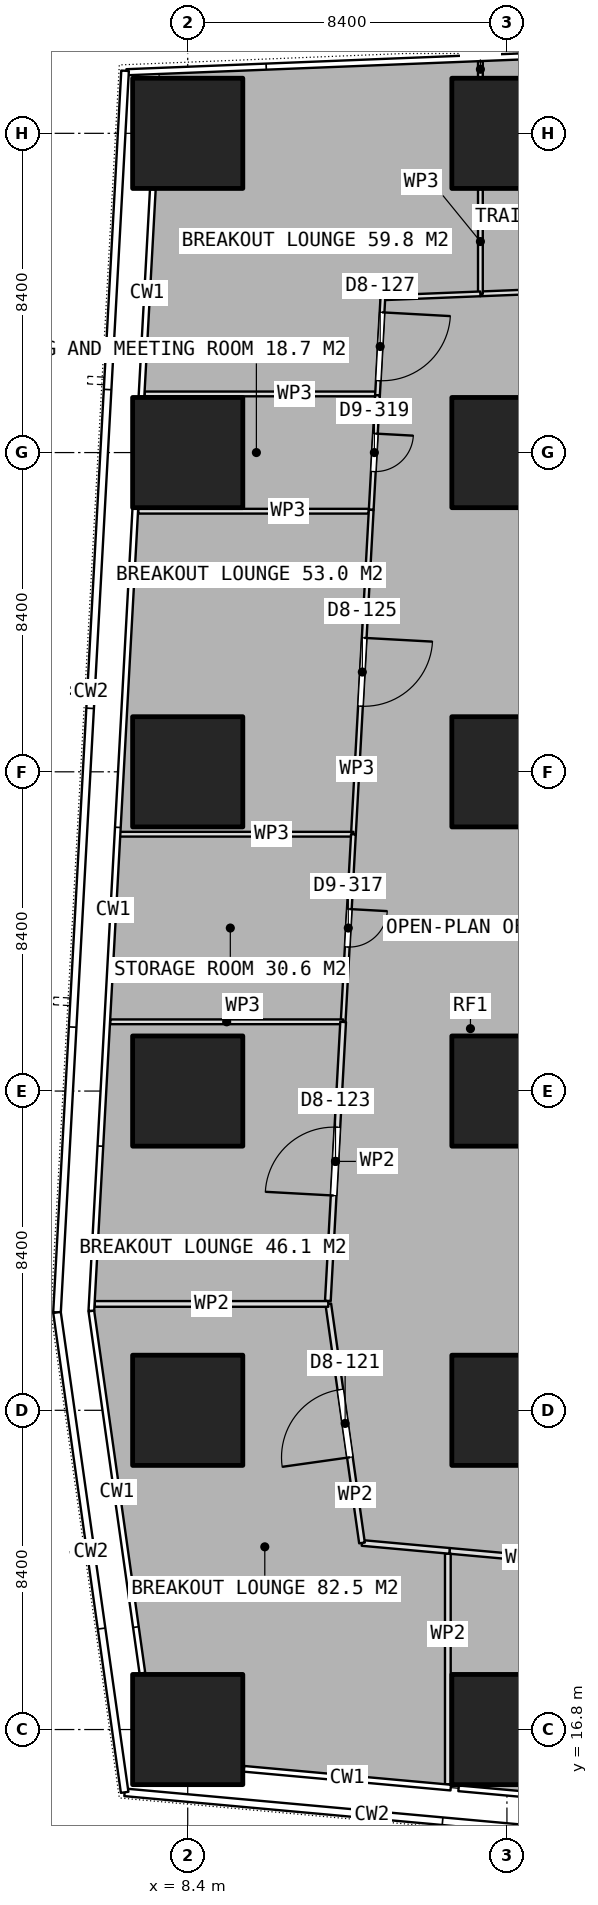
"""IFC4 building model, lengths in metres.
Left out: names, types, materials, properties, quantities, classifications, styles, units other than length and angle.
Written with IfcOpenShell. Run it as: python <this file> out.ifc"""

import sys

from ifc_helpers import new_model, si_unit, direction, frame, frame_2d, origin, origin_2d, place, context, subcontext, project, spatial, rectangle, extrude, element, fill, save


model = new_model("IFC4")
c1 = context("Model", 3, precision=1e-05, world=origin(), true_north=direction((0.0, 1.0)))
c2 = subcontext(c1, "Body", "Model", "MODEL_VIEW")
j1 = project(units=[si_unit("LENGTHUNIT", "METRE"), si_unit("PLANEANGLEUNIT", "RADIAN")], contexts=[c1])
p1 = place(None, origin())
s1 = spatial("IfcSite", under=j1, at=p1, CompositionType="ELEMENT")
p2 = place(p1, origin())
s2 = spatial("IfcBuilding", under=s1, at=p2, CompositionType="ELEMENT")
p3 = place(p2, frame((0.0, 0.0, 95.3)))
s3 = spatial("IfcBuildingStorey", under=s2, at=p3, CompositionType="ELEMENT", Elevation=95.3)
for number, where, z_axis, x_axis in (
    (1, (8.4, 16.8, 0.0), (0.0, 0.0, 1.0), (1.0, 0.0, 0.0)),
    (2, (8.4, 25.2, 0.0), (0.0, 0.0, 1.0), (1.0, 0.0, 0.0)),
    (3, (8.4, 33.6, 0.0), (0.0, 0.0, 1.0), (1.0, 0.0, 0.0)),
    (4, (8.4, 42.0, 0.0), (0.0, 0.0, 1.0), (1.0, 0.0, 0.0)),
    (5, (8.4, 50.4, 0.0), (0.0, 0.0, 1.0), (1.0, 0.0, 0.0)),
    (6, (8.4, 58.8, 0.0), (0.0, 0.0, 1.0), (1.0, 0.0, 0.0)),
    (7, (16.8, 16.8, 0.0), (0.0, 0.0, 1.0), (1.0, 0.0, 0.0)),
    (8, (16.8, 25.2, 0.0), (0.0, 0.0, 1.0), (1.0, 0.0, 0.0)),
    (9, (16.8, 33.6, 0.0), (0.0, 0.0, 1.0), (1.0, 0.0, 0.0)),
    (10, (16.8, 42.0, 0.0), (0.0, 0.0, 1.0), (1.0, 0.0, 0.0)),
    (11, (16.8, 50.4, 0.0), (0.0, 0.0, 1.0), (1.0, 0.0, 0.0)),
    (12, (16.8, 58.8, 0.0), (0.0, 0.0, 1.0), (1.0, 0.0, 0.0)),
):
    element("IfcColumn", number, at=place(p3, frame(where, z_axis=z_axis, x_axis=x_axis)), inside=s3, PredefinedType="COLUMN", context=c2, shape_type="SweptSolid", body=[
        extrude(rectangle(XDim=2.9, YDim=2.9, at=origin_2d()), origin(), (0.0, 0.0, 1.0), 3.75),
    ])
p4 = place(p3, frame((25.413, 54.949, 0.0), z_axis=(0.0, 0.0, 1.0), x_axis=(-0.999198361773, -0.04003290935, 0.0)))
e13 = element("IfcWall", 13, at=p4, inside=s3, PredefinedType="PARTITIONING", context=c2, shape_type="SweptSolid", body=[
    extrude(rectangle(XDim=9.319, YDim=0.125, at=frame_2d((4.659, 0.0))), origin(), (0.0, 0.0, 1.0), 3.5),
])
p5 = place(p4, frame((3.759, 0.0, 0.0)))
e14 = element("IfcOpeningElement", 14, at=p5, cuts=e13, PredefinedType="OPENING", context=c2, shape_type="SweptSolid", body=[
    extrude(rectangle(XDim=1.8, YDim=2.1, at=frame_2d((0.9, 1.05))), frame((0.0, 0.073, 0.0), z_axis=(0.0, -1.0, 0.0), x_axis=(1.0, 0.0, 0.0)), (0.0, 0.0, 1.0), 0.145),
])
p6 = place(p3, frame((16.102, 54.576, 0.0), z_axis=(0.0, 0.0, 1.0), x_axis=(0.0, 1.0, 0.0)))
e15 = element("IfcWall", 15, at=p6, inside=s3, PredefinedType="PARTITIONING", context=c2, shape_type="SweptSolid", body=[
    extrude(rectangle(XDim=2.754, YDim=0.125, at=frame_2d((1.377, 0.0))), origin(), (0.0, 0.0, 1.0), 3.5),
])
p7 = place(p3, frame((16.102, 60.27, 0.0), z_axis=(0.0, 0.0, 1.0), x_axis=(0.0, 1.0, 0.0)))
e16 = element("IfcWall", 16, at=p7, inside=s3, PredefinedType="PARTITIONING", context=c2, shape_type="SweptSolid", body=[
    extrude(rectangle(XDim=0.43, YDim=0.125, at=frame_2d((0.215, 0.0))), origin(), (0.0, 0.0, 1.0), 3.5),
])
p8 = place(p3, frame((13.333, 51.943, 0.0), z_axis=(0.0, 0.0, 1.0), x_axis=(-1.0, 0.0, 0.0)))
e17 = element("IfcWall", 17, at=p8, inside=s3, PredefinedType="PARTITIONING", context=c2, shape_type="SweptSolid", body=[
    extrude(rectangle(XDim=6.066, YDim=0.125, at=frame_2d((3.033, 0.0))), origin(), (0.0, 0.0, 1.0), 3.5),
])
p9 = place(p3, frame((16.101, 54.576, 0.0), z_axis=(0.0, 0.0, 1.0), x_axis=(-0.999195025369, -0.040116097489, 0.0)))
e18 = element("IfcWall", 18, at=p9, inside=s3, PredefinedType="PARTITIONING", context=c2, shape_type="SweptSolid", body=[
    extrude(rectangle(XDim=2.568, YDim=0.125, at=frame_2d((1.284, 0.0))), origin(), (0.0, 0.0, 1.0), 3.5),
])
p10 = place(p3, frame((13.535, 54.473, 0.0), z_axis=(0.0, 0.0, 1.0), x_axis=(-0.054838354895, -0.998495245273, 0.0)))
e19 = element("IfcWall", 19, at=p10, inside=s3, PredefinedType="PARTITIONING", context=c2, shape_type="SweptSolid", body=[
    extrude(rectangle(XDim=2.569, YDim=0.125, at=frame_2d((1.284, 0.0))), origin(), (0.0, 0.0, 1.0), 3.5),
])
p11 = place(p10, frame((0.384, 0.0, 0.0)))
e20 = element("IfcOpeningElement", 20, at=p11, cuts=e19, PredefinedType="OPENING", context=c2, shape_type="SweptSolid", body=[
    extrude(rectangle(XDim=1.8, YDim=2.1, at=frame_2d((0.9, 1.05))), frame((0.0, 0.073, 0.0), z_axis=(0.0, -1.0, 0.0), x_axis=(1.0, 0.0, 0.0)), (0.0, 0.0, 1.0), 0.145),
])
p12 = place(p3, frame((13.394, 51.907, 0.0), z_axis=(0.0, 0.0, 1.0), x_axis=(-0.054694766207, -0.998503120951, 0.0)))
e21 = element("IfcWall", 21, at=p12, inside=s3, PredefinedType="PARTITIONING", context=c2, shape_type="SweptSolid", body=[
    extrude(rectangle(XDim=3.018, YDim=0.125, at=frame_2d((1.509, 0.0))), origin(), (0.0, 0.0, 1.0), 3.5),
])
p13 = place(p12, frame((1.009, 0.0, 0.0)))
e22 = element("IfcOpeningElement", 22, at=p13, cuts=e21, PredefinedType="OPENING", context=c2, shape_type="SweptSolid", body=[
    extrude(rectangle(XDim=1.0, YDim=2.1, at=frame_2d((0.5, 1.05))), frame((0.0, 0.073, 0.0), z_axis=(0.0, -1.0, 0.0), x_axis=(1.0, 0.0, 0.0)), (0.0, 0.0, 1.0), 0.145),
])
p14 = place(p3, frame((13.164, 48.857, 0.0), z_axis=(0.0, 0.0, 1.0), x_axis=(-1.0, 0.0, 0.0)))
e23 = element("IfcWall", 23, at=p14, inside=s3, PredefinedType="PARTITIONING", context=c2, shape_type="SweptSolid", body=[
    extrude(rectangle(XDim=6.066, YDim=0.125, at=frame_2d((3.033, 0.0))), origin(), (0.0, 0.0, 1.0), 3.5),
])
p15 = place(p3, frame((13.229, 48.893, 0.0), z_axis=(0.0, 0.0, 1.0), x_axis=(-0.054751844568, -0.998499992747, 0.0)))
e24 = element("IfcWall", 24, at=p15, inside=s3, PredefinedType="PARTITIONING", context=c2, shape_type="SweptSolid", body=[
    extrude(rectangle(XDim=8.548, YDim=0.125, at=frame_2d((4.274, 0.0))), origin(), (0.0, 0.0, 1.0), 3.5),
])
p16 = place(p15, frame((3.374, 0.0, 0.0)))
e25 = element("IfcOpeningElement", 25, at=p16, cuts=e24, PredefinedType="OPENING", context=c2, shape_type="SweptSolid", body=[
    extrude(rectangle(XDim=1.8, YDim=2.1, at=frame_2d((0.9, 1.05))), frame((0.0, 0.073, 0.0), z_axis=(0.0, -1.0, 0.0), x_axis=(1.0, 0.0, 0.0)), (0.0, 0.0, 1.0), 0.145),
])
p17 = place(p3, frame((12.761, 40.358, 0.0), z_axis=(0.0, 0.0, 1.0), x_axis=(-1.0, 0.0, 0.0)))
e26 = element("IfcWall", 26, at=p17, inside=s3, PredefinedType="PARTITIONING", context=c2, shape_type="SweptSolid", body=[
    extrude(rectangle(XDim=6.159, YDim=0.125, at=frame_2d((3.08, 0.0))), origin(), (0.0, 0.0, 1.0), 3.5),
])
p18 = place(p3, frame((12.761, 40.357, 0.0), z_axis=(0.0, 0.0, 1.0), x_axis=(-0.054832537322, -0.998495564763, 0.0)))
e27 = element("IfcWall", 27, at=p18, inside=s3, PredefinedType="PARTITIONING", context=c2, shape_type="SweptSolid", body=[
    extrude(rectangle(XDim=4.942, YDim=0.125, at=frame_2d((2.471, 0.0))), origin(), (0.0, 0.0, 1.0), 3.5),
])
p19 = place(p18, frame((1.971, 0.0, 0.0)))
e28 = element("IfcOpeningElement", 28, at=p19, cuts=e27, PredefinedType="OPENING", context=c2, shape_type="SweptSolid", body=[
    extrude(rectangle(XDim=1.0, YDim=2.1, at=frame_2d((0.5, 1.05))), frame((0.0, 0.073, 0.0), z_axis=(0.0, -1.0, 0.0), x_axis=(1.0, 0.0, 0.0)), (0.0, 0.0, 1.0), 0.145),
])
p20 = place(p3, frame((12.49, 35.422, 0.0), z_axis=(0.0, 0.0, 1.0), x_axis=(-1.0, 0.0, 0.0)))
e29 = element("IfcWall", 29, at=p20, inside=s3, PredefinedType="PARTITIONING", context=c2, shape_type="SweptSolid", body=[
    extrude(rectangle(XDim=6.129, YDim=0.125, at=frame_2d((3.064, 0.0))), origin(), (0.0, 0.0, 1.0), 3.5),
])
p21 = place(p3, frame((19.125, 21.153, 0.0), z_axis=(0.0, 0.0, 1.0), x_axis=(-0.99591033818, 0.090347099052, 0.0)))
e30 = element("IfcWall", 30, at=p21, inside=s3, PredefinedType="PARTITIONING", context=c2, shape_type="SweptSolid", body=[
    extrude(rectangle(XDim=3.851, YDim=0.15, at=frame_2d((1.925, 0.0))), origin(), (0.0, 0.0, 1.0), 3.5),
])
p22 = place(p3, frame((15.245, 21.43, 0.0), z_axis=(0.0, 0.0, 1.0), x_axis=(0.0, -1.0, 0.0)))
e31 = element("IfcWall", 31, at=p22, inside=s3, PredefinedType="PARTITIONING", context=c2, shape_type="SweptSolid", body=[
    extrude(rectangle(XDim=6.07, YDim=0.15, at=frame_2d((3.035, 0.0))), origin(), (0.0, 0.0, 1.0), 3.5),
])
p23 = place(p3, frame((15.29, 21.501, 0.0), z_axis=(0.0, 0.0, 1.0), x_axis=(-0.995911351873, 0.090335924256, 0.0)))
e32 = element("IfcWall", 32, at=p23, inside=s3, PredefinedType="PARTITIONING", context=c2, shape_type="SweptSolid", body=[
    extrude(rectangle(XDim=2.313, YDim=0.15, at=frame_2d((1.157, 0.0))), origin(), (0.0, 0.0, 1.0), 3.5),
])
p24 = place(p3, frame((12.986, 21.71, 0.0), z_axis=(0.0, 0.0, 1.0), x_axis=(-0.139650607895, 0.99020084211, 0.0)))
e33 = element("IfcWall", 33, at=p24, inside=s3, PredefinedType="PARTITIONING", context=c2, shape_type="SweptSolid", body=[
    extrude(rectangle(XDim=6.351, YDim=0.15, at=frame_2d((3.176, 0.0))), origin(), (0.0, 0.0, 1.0), 3.5),
])
p25 = place(p24, frame((2.276, 0.0, 0.0)))
e34 = element("IfcOpeningElement", 34, at=p25, cuts=e33, PredefinedType="OPENING", context=c2, shape_type="SweptSolid", body=[
    extrude(rectangle(XDim=1.8, YDim=2.1, at=frame_2d((0.9, 1.05))), frame((0.0, 0.085, 0.0), z_axis=(0.0, -1.0, 0.0), x_axis=(1.0, 0.0, 0.0)), (0.0, 0.0, 1.0), 0.17),
])
p26 = place(p3, frame((12.099, 27.999, 0.0), z_axis=(0.0, 0.0, 1.0), x_axis=(-1.0, 0.0, 0.0)))
e35 = element("IfcWall", 35, at=p26, inside=s3, PredefinedType="PARTITIONING", context=c2, shape_type="SweptSolid", body=[
    extrude(rectangle(XDim=6.145, YDim=0.15, at=frame_2d((3.073, 0.0))), origin(), (0.0, 0.0, 1.0), 3.5),
])
p27 = place(p3, frame((12.088, 28.079, 0.0), z_axis=(0.0, 0.0, 1.0), x_axis=(0.054701106578, 0.998502773626, 0.0)))
e36 = element("IfcWall", 36, at=p27, inside=s3, PredefinedType="PARTITIONING", context=c2, shape_type="SweptSolid", body=[
    extrude(rectangle(XDim=7.351, YDim=0.15, at=frame_2d((3.675, 0.0))), origin(), (0.0, 0.0, 1.0), 3.5),
])
p28 = place(p27, frame((2.776, 0.0, 0.0)))
e37 = element("IfcOpeningElement", 37, at=p28, cuts=e36, PredefinedType="OPENING", context=c2, shape_type="SweptSolid", body=[
    extrude(rectangle(XDim=1.8, YDim=2.1, at=frame_2d((0.9, 1.05))), frame((0.0, 0.085, 0.0), z_axis=(0.0, -1.0, 0.0), x_axis=(1.0, 0.0, 0.0)), (0.0, 0.0, 1.0), 0.17),
])
p29 = place(p11, origin())
e38 = element("IfcDoor", 38, at=p29, inside=s3, OperationType="DOUBLE_DOOR_SINGLE_SWING", PredefinedType="DOOR", context=c2, shape_type="SweptSolid", body=[
    extrude(rectangle(XDim=1.8, YDim=2.1, at=frame_2d((0.9, 1.05))), frame((0.0, 0.025, 0.0), z_axis=(0.0, -1.0, 0.0), x_axis=(1.0, 0.0, 0.0)), (0.0, 0.0, 1.0), 0.05),
])
fill(e20, e38)
p30 = place(p13, origin())
e39 = element("IfcDoor", 39, at=p30, inside=s3, OperationType="SINGLE_SWING_LEFT", PredefinedType="DOOR", context=c2, shape_type="SweptSolid", body=[
    extrude(rectangle(XDim=1.0, YDim=2.1, at=frame_2d((0.5, 1.05))), frame((0.0, 0.025, 0.0), z_axis=(0.0, -1.0, 0.0), x_axis=(1.0, 0.0, 0.0)), (0.0, 0.0, 1.0), 0.05),
])
fill(e22, e39)
p31 = place(p16, origin())
e40 = element("IfcDoor", 40, at=p31, inside=s3, OperationType="DOUBLE_DOOR_SINGLE_SWING", PredefinedType="DOOR", context=c2, shape_type="SweptSolid", body=[
    extrude(rectangle(XDim=1.8, YDim=2.1, at=frame_2d((0.9, 1.05))), frame((0.0, 0.025, 0.0), z_axis=(0.0, -1.0, 0.0), x_axis=(1.0, 0.0, 0.0)), (0.0, 0.0, 1.0), 0.05),
])
fill(e25, e40)
p32 = place(p19, origin())
e41 = element("IfcDoor", 41, at=p32, inside=s3, OperationType="SINGLE_SWING_LEFT", PredefinedType="DOOR", context=c2, shape_type="SweptSolid", body=[
    extrude(rectangle(XDim=1.0, YDim=2.1, at=frame_2d((0.5, 1.05))), frame((0.0, 0.025, 0.0), z_axis=(0.0, -1.0, 0.0), x_axis=(1.0, 0.0, 0.0)), (0.0, 0.0, 1.0), 0.05),
])
fill(e28, e41)
p33 = place(p28, origin())
e42 = element("IfcDoor", 42, at=p33, inside=s3, OperationType="DOUBLE_DOOR_SINGLE_SWING", PredefinedType="DOOR", context=c2, shape_type="SweptSolid", body=[
    extrude(rectangle(XDim=1.8, YDim=2.1, at=frame_2d((0.9, 1.05))), frame((0.0, 0.025, 0.0), z_axis=(0.0, -1.0, 0.0), x_axis=(1.0, 0.0, 0.0)), (0.0, 0.0, 1.0), 0.05),
])
fill(e37, e42)
p34 = place(p25, origin())
e43 = element("IfcDoor", 43, at=p34, inside=s3, OperationType="DOUBLE_DOOR_SINGLE_SWING", PredefinedType="DOOR", context=c2, shape_type="SweptSolid", body=[
    extrude(rectangle(XDim=1.8, YDim=2.1, at=frame_2d((0.9, 1.05))), frame((0.0, 0.025, 0.0), z_axis=(0.0, -1.0, 0.0), x_axis=(1.0, 0.0, 0.0)), (0.0, 0.0, 1.0), 0.05),
])
fill(e34, e43)
save(model, sys.argv[1])
